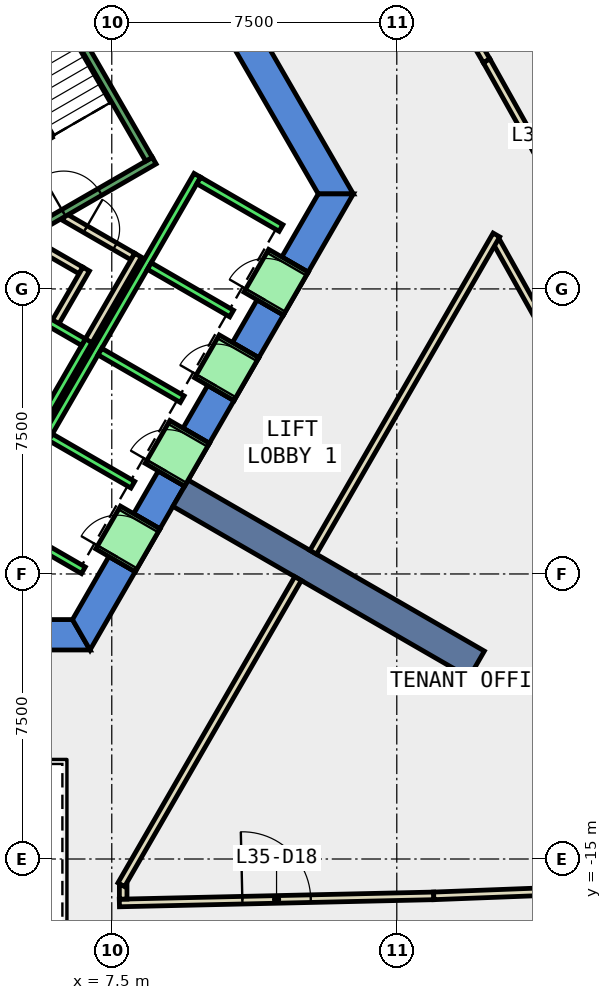
"""IFC4 building model, lengths in metres.
Left out: names, types, materials, properties, quantities, classifications, styles, units other than length and angle.
Written with IfcOpenShell. Run it as: python <this file> out.ifc"""

import sys

from ifc_helpers import new_model, si_unit, direction, frame, frame_2d, origin, place, context, subcontext, project, spatial, polyline, rectangle, outline, extrude, element, fill, save


model = new_model("IFC4")
c1 = context("Model", 3, precision=1e-05, world=origin(), true_north=direction((0.0, 1.0)))
c2 = subcontext(c1, "Body", "Model", "MODEL_VIEW")
j1 = project(units=[si_unit("LENGTHUNIT", "METRE"), si_unit("PLANEANGLEUNIT", "RADIAN")], contexts=[c1])
p1 = place(None, origin())
s1 = spatial("IfcSite", under=j1, at=p1, CompositionType="ELEMENT")
p2 = place(p1, origin())
s2 = spatial("IfcBuilding", under=s1, at=p2, CompositionType="ELEMENT")
p3 = place(p2, frame((0.0, 0.0, 159.2)))
s3 = spatial("IfcBuildingStorey", under=s2, at=p3, CompositionType="ELEMENT", Elevation=159.2)
p4 = place(p3, frame((0.0, 0.0, -0.4)))
e1 = element("IfcWall", 1, at=p4, inside=s3, PredefinedType="SHEAR", context=c2, shape_type="SweptSolid", body=[
    extrude(outline(polyline([(8.517, 11.748), (7.824, 11.348), (12.933, 2.5), (13.856, 2.5), (8.517, 11.748)])), origin(), (0.0, 0.0, 1.0), 4.2),
])
p5 = place(p3, frame((0.0, 0.0, -0.4)))
e2 = element("IfcWall", 2, at=p5, inside=s3, PredefinedType="SHEAR", context=c2, shape_type="SweptSolid", body=[
    extrude(outline(polyline([(5.75, -8.7), (5.75, -9.5), (6.928, -9.5), (6.466, -8.7), (5.75, -8.7)])), origin(), (0.0, 0.0, 1.0), 4.2),
])
p6 = place(p3, frame((0.0, 0.0, -0.4)))
e3 = element("IfcWall", 3, at=p6, inside=s3, PredefinedType="SHEAR", context=c2, shape_type="SweptSolid", body=[
    extrude(outline(polyline([(8.117, -7.44), (7.424, -7.04), (6.466, -8.7), (6.928, -9.5), (8.117, -7.44)])), origin(), (0.0, 0.0, 1.0), 4.2),
])
p7 = place(p3, frame((0.0, 0.0, -0.4)))
e4 = element("IfcWall", 4, at=p7, inside=s3, PredefinedType="SHEAR", context=c2, shape_type="SweptSolid", body=[
    extrude(outline(polyline([(9.417, -5.189), (8.724, -4.789), (8.075, -5.914), (8.767, -6.314), (9.417, -5.189)])), origin(), (0.0, 0.0, 1.0), 4.2),
])
p8 = place(p3, frame((0.0, 0.0, -0.4)))
e5 = element("IfcWall", 5, at=p8, inside=s3, PredefinedType="SHEAR", context=c2, shape_type="SweptSolid", body=[
    extrude(outline(polyline([(10.717, -2.937), (10.025, -2.537), (9.374, -3.663), (10.067, -4.063), (10.717, -2.937)])), origin(), (0.0, 0.0, 1.0), 4.2),
])
p9 = place(p3, frame((0.0, 0.0, -0.4)))
e6 = element("IfcWall", 6, at=p9, inside=s3, PredefinedType="SHEAR", context=c2, shape_type="SweptSolid", body=[
    extrude(outline(polyline([(12.017, -0.686), (11.324, -0.286), (10.675, -1.411), (11.367, -1.811), (12.017, -0.686)])), origin(), (0.0, 0.0, 1.0), 4.2),
])
p10 = place(p3, frame((0.0, 0.0, -0.4)))
e7 = element("IfcWall", 7, at=p10, inside=s3, PredefinedType="SHEAR", context=c2, shape_type="SweptSolid", body=[
    extrude(outline(polyline([(11.974, 0.84), (12.667, 0.44), (13.856, 2.5), (12.933, 2.5), (11.974, 0.84)])), origin(), (0.0, 0.0, 1.0), 4.2),
])
p11 = place(p3, frame((0.0, 0.0, 3.6)))
e8 = element("IfcWall", 8, at=p11, inside=s3, PredefinedType="SHEAR", context=c2, shape_type="SweptSolid", body=[
    extrude(outline(polyline([(8.767, -6.314), (8.075, -5.914), (7.424, -7.04), (8.117, -7.44), (8.767, -6.314)])), origin(), (0.0, 0.0, 1.0), 0.2),
])
p12 = place(p3, frame((0.0, 0.0, 3.6)))
e9 = element("IfcWall", 9, at=p12, inside=s3, PredefinedType="SHEAR", context=c2, shape_type="SweptSolid", body=[
    extrude(outline(polyline([(10.067, -4.063), (9.374, -3.663), (8.724, -4.789), (9.417, -5.189), (10.067, -4.063)])), origin(), (0.0, 0.0, 1.0), 0.2),
])
p13 = place(p3, frame((0.0, 0.0, 3.6)))
e10 = element("IfcWall", 10, at=p13, inside=s3, PredefinedType="SHEAR", context=c2, shape_type="SweptSolid", body=[
    extrude(outline(polyline([(11.367, -1.811), (10.675, -1.411), (10.025, -2.537), (10.717, -2.937), (11.367, -1.811)])), origin(), (0.0, 0.0, 1.0), 0.2),
])
p14 = place(p3, frame((0.0, 0.0, 3.6)))
e11 = element("IfcWall", 11, at=p14, inside=s3, PredefinedType="SHEAR", context=c2, shape_type="SweptSolid", body=[
    extrude(outline(polyline([(12.667, 0.44), (11.974, 0.84), (11.324, -0.286), (12.017, -0.686), (12.667, 0.44)])), origin(), (0.0, 0.0, 1.0), 0.2),
])
p15 = place(p3, frame((9.31, -5.375, -0.4), z_axis=(0.0, 0.0, 1.0), x_axis=(0.866017533419, -0.500013631625, 0.0)))
e12 = element("IfcWall", 12, at=p15, inside=s3, PredefinedType="SHEAR", context=c2, shape_type="SweptSolid", body=[
    extrude(rectangle(XDim=9.0, YDim=0.8, at=frame_2d((4.5, 0.0))), origin(), (0.0, 0.0, 1.0), 4.2),
])
p16 = place(p3, frame((7.7, -16.157, 0.0), z_axis=(0.0, 0.0, 1.0), x_axis=(0.999744539931, 0.022602098978, 0.0)))
e13 = element("IfcWall", 13, at=p16, inside=s3, PredefinedType="PARTITIONING", context=c2, shape_type="SweptSolid", body=[
    extrude(rectangle(XDim=8.274, YDim=0.2, at=frame_2d((4.137, 0.0))), origin(), (0.0, 0.0, 1.0), 3.8),
])
p17 = place(p16, frame((3.237, 0.0, 0.0)))
e14 = element("IfcOpeningElement", 14, at=p17, cuts=e13, PredefinedType="OPENING", context=c2, shape_type="SweptSolid", body=[
    extrude(rectangle(XDim=1.8, YDim=2.1, at=frame_2d((0.9, 1.05))), frame((0.0, 0.11, 0.0), z_axis=(0.0, -1.0, 0.0), x_axis=(1.0, 0.0, 0.0)), (0.0, 0.0, 1.0), 0.22),
])
p18 = place(p3, frame((15.972, -15.97, 0.0), z_axis=(0.0, 0.0, 1.0), x_axis=(0.999262695969, 0.038393546916, 0.0)))
e15 = element("IfcWall", 15, at=p18, inside=s3, PredefinedType="PARTITIONING", context=c2, shape_type="SweptSolid", body=[
    extrude(rectangle(XDim=7.344, YDim=0.2, at=frame_2d((3.672, 0.0))), origin(), (0.0, 0.0, 1.0), 3.8),
])
p19 = place(p3, frame((18.93, -1.095, 0.0), z_axis=(0.0, 0.0, 1.0), x_axis=(-0.488268004118, 0.872693735599, 0.0)))
e16 = element("IfcWall", 16, at=p19, inside=s3, PredefinedType="PARTITIONING", context=c2, shape_type="SweptSolid", body=[
    extrude(rectangle(XDim=2.683, YDim=0.2, at=frame_2d((1.341, 0.0))), origin(), (0.0, 0.0, 1.0), 3.8),
])
p20 = place(p3, frame((15.659, 8.954, 0.0), z_axis=(0.0, 0.0, 1.0), x_axis=(0.50001992892, -0.866013897511, 0.0)))
e17 = element("IfcWall", 17, at=p20, inside=s3, PredefinedType="PARTITIONING", context=c2, shape_type="SweptSolid", body=[
    extrude(rectangle(XDim=3.41, YDim=0.2, at=frame_2d((1.705, 0.0))), origin(), (0.0, 0.0, 1.0), 3.8),
])
p21 = place(p3, frame((17.364, 6.001, 0.0), z_axis=(0.0, 0.0, 1.0), x_axis=(0.488528981592, -0.872547668695, 0.0)))
e18 = element("IfcWall", 18, at=p21, inside=s3, PredefinedType="PARTITIONING", context=c2, shape_type="SweptSolid", body=[
    extrude(rectangle(XDim=6.896, YDim=0.2, at=frame_2d((3.448, 0.0))), origin(), (0.0, 0.0, 1.0), 3.8),
])
p22 = place(p21, frame((3.023, 0.0, 0.0)))
e19 = element("IfcOpeningElement", 19, at=p22, cuts=e18, PredefinedType="OPENING", context=c2, shape_type="SweptSolid", body=[
    extrude(rectangle(XDim=1.0, YDim=2.1, at=frame_2d((0.5, 1.05))), frame((0.0, 0.11, 0.0), z_axis=(0.0, -1.0, 0.0), x_axis=(1.0, 0.0, 0.0)), (0.0, 0.0, 1.0), 0.22),
])
p23 = place(p3, frame((5.499, 1.172, 0.0), z_axis=(0.0, 0.0, 1.0), x_axis=(0.866333505267, -0.499465972466, 0.0)))
e20 = element("IfcWall", 20, at=p23, inside=s3, PredefinedType="PARTITIONING", context=c2, shape_type="SweptSolid", body=[
    extrude(rectangle(XDim=1.374, YDim=0.2, at=frame_2d((0.687, 0.0))), origin(), (0.0, 0.0, 1.0), 3.8),
])
p24 = place(p3, frame((6.826, 0.522, 0.0), z_axis=(0.0, 0.0, 1.0), x_axis=(-0.500016722714, -0.866015748706, 0.0)))
e21 = element("IfcWall", 21, at=p24, inside=s3, PredefinedType="PARTITIONING", context=c2, shape_type="SweptSolid", body=[
    extrude(rectangle(XDim=1.7, YDim=0.2, at=frame_2d((0.85, 0.0))), origin(), (0.0, 0.0, 1.0), 3.8),
])
p25 = place(p3, frame((6.25, 1.894, 0.0), z_axis=(0.0, 0.0, 1.0), x_axis=(0.866043184279, -0.499969202016, 0.0)))
e22 = element("IfcWall", 22, at=p25, inside=s3, PredefinedType="PARTITIONING", context=c2, shape_type="SweptSolid", body=[
    extrude(rectangle(XDim=2.084, YDim=0.2, at=frame_2d((1.042, 0.0))), origin(), (0.0, 0.0, 1.0), 3.8),
])
p26 = place(p25, frame((0.642, 0.0, 0.0)))
e23 = element("IfcOpeningElement", 23, at=p26, cuts=e22, PredefinedType="OPENING", context=c2, shape_type="SweptSolid", body=[
    extrude(rectangle(XDim=0.9, YDim=2.1, at=frame_2d((0.45, 1.05))), frame((0.0, 0.11, 0.0), z_axis=(0.0, -1.0, 0.0), x_axis=(1.0, 0.0, 0.0)), (0.0, 0.0, 1.0), 0.22),
])
p27 = place(p3, frame((8.192, 0.888, 0.0), z_axis=(0.0, 0.0, 1.0), x_axis=(-0.499940625693, -0.866059680843, 0.0)))
e24 = element("IfcWall", 24, at=p27, inside=s3, PredefinedType="PARTITIONING", context=c2, shape_type="SweptSolid", body=[
    extrude(rectangle(XDim=2.68, YDim=0.2, at=frame_2d((1.34, 0.0))), origin(), (0.0, 0.0, 1.0), 3.8),
])
p28 = place(p3, frame((7.8, -15.69, 0.0), z_axis=(0.0, 0.0, 1.0), x_axis=(0.0, -1.0, 0.0)))
e25 = element("IfcWall", 25, at=p28, inside=s3, PredefinedType="PARTITIONING", context=c2, shape_type="SweptSolid", body=[
    extrude(rectangle(XDim=0.365, YDim=0.2, at=frame_2d((0.183, 0.0))), origin(), (0.0, 0.0, 1.0), 3.8),
])
p29 = place(p3, frame((17.621, 1.42, 0.0), z_axis=(0.0, 0.0, 1.0), x_axis=(-0.499987708133, -0.866032500381, 0.0)))
e26 = element("IfcWall", 26, at=p29, inside=s3, PredefinedType="PARTITIONING", context=c2, shape_type="SweptSolid", body=[
    extrude(rectangle(XDim=9.64, YDim=0.2, at=frame_2d((4.82, 0.0))), origin(), (0.0, 0.0, 1.0), 3.8),
])
p30 = place(p3, frame((12.401, -7.621, 0.0), z_axis=(0.0, 0.0, 1.0), x_axis=(-0.499983724212, -0.866034800411, 0.0)))
e27 = element("IfcWall", 27, at=p30, inside=s3, PredefinedType="PARTITIONING", context=c2, shape_type="SweptSolid", body=[
    extrude(rectangle(XDim=9.302, YDim=0.2, at=frame_2d((4.651, 0.0))), origin(), (0.0, 0.0, 1.0), 3.8),
])
p31 = place(p3, frame((5.492, -3.788, 0.0), z_axis=(0.0, 0.0, 1.0), x_axis=(0.500011755427, 0.866018616679, 0.0)))
e28 = element("IfcWall", 28, at=p31, inside=s3, PredefinedType="STANDARD", context=c2, shape_type="SweptSolid", body=[
    extrude(rectangle(XDim=2.8, YDim=0.2, at=frame_2d((1.4, 0.0))), origin(), (0.0, 0.0, 1.0), 3.8),
])
p32 = place(p3, frame((4.677, -0.2, 0.0), z_axis=(0.0, 0.0, 1.0), x_axis=(0.865973769406, -0.500089422704, 0.0)))
e29 = element("IfcWall", 29, at=p32, inside=s3, PredefinedType="STANDARD", context=c2, shape_type="SweptSolid", body=[
    extrude(rectangle(XDim=2.399, YDim=0.2, at=frame_2d((1.2, 0.0))), origin(), (0.0, 0.0, 1.0), 3.8),
])
p33 = place(p3, frame((4.451, -6.19, 0.0), z_axis=(0.0, 0.0, 1.0), x_axis=(0.50000090737, 0.866024879913, 0.0)))
e30 = element("IfcWall", 30, at=p33, inside=s3, PredefinedType="STANDARD", context=c2, shape_type="SweptSolid", body=[
    extrude(rectangle(XDim=10.6, YDim=0.2, at=frame_2d((5.3, 0.0))), origin(), (0.0, 0.0, 1.0), 3.8),
])
for number, where, z_axis, x_axis in (
    (31, (4.588, -6.153, 0.0), (0.0, 0.0, 1.0), (0.866, -0.5, 0.0)),
    (32, (5.888, -3.902, 0.0), (0.0, 0.0, 1.0), (0.866, -0.5, 0.0)),
    (33, (7.188, -1.65, 0.0), (0.0, 0.0, 1.0), (0.866, -0.5, 0.0)),
    (34, (8.488, 0.602, 0.0), (0.0, 0.0, 1.0), (0.866, -0.5, 0.0)),
):
    element("IfcWall", number, at=place(p3, frame(where, z_axis=z_axis, x_axis=x_axis)), inside=s3, PredefinedType="STANDARD", context=c2, shape_type="SweptSolid", body=[
        extrude(rectangle(XDim=2.5, YDim=0.2, at=frame_2d((1.25, 0.0))), origin(), (0.0, 0.0, 1.0), 3.8),
    ])
p34 = place(p3, frame((9.788, 2.853, 0.0), z_axis=(0.0, 0.0, 1.0), x_axis=(0.865998541277, -0.500046524342, 0.0)))
e35 = element("IfcWall", 35, at=p34, inside=s3, PredefinedType="STANDARD", context=c2, shape_type="SweptSolid", body=[
    extrude(rectangle(XDim=2.5, YDim=0.2, at=frame_2d((1.25, 0.0))), origin(), (0.0, 0.0, 1.0), 3.8),
])
p35 = place(p3, frame((7.598, -7.14, 0.0), z_axis=(0.0, 0.0, 1.0), x_axis=(0.500362116554, 0.865816234728, 0.0)))
e36 = element("IfcWall", 36, at=p35, inside=s3, PredefinedType="STANDARD", context=c2, shape_type="SweptSolid", body=[
    extrude(rectangle(XDim=1.299, YDim=1.2, at=frame_2d((0.65, 0.0))), origin(), (0.0, 0.0, 1.0), 2.4),
])
p36 = place(p35, frame((0.1, 0.0, 0.0)))
e37 = element("IfcOpeningElement", 37, at=p36, cuts=e36, PredefinedType="OPENING", context=c2, shape_type="SweptSolid", body=[
    extrude(rectangle(XDim=1.1, YDim=2.3, at=frame_2d((0.55, 1.15))), frame((0.0, 0.61, 0.0), z_axis=(0.0, -1.0, 0.0), x_axis=(1.0, 0.0, 0.0)), (0.0, 0.0, 1.0), 1.22),
])
p37 = place(p3, frame((8.898, -4.889, 0.0), z_axis=(0.0, 0.0, 1.0), x_axis=(0.500036693733, 0.866004217611, 0.0)))
e38 = element("IfcWall", 38, at=p37, inside=s3, PredefinedType="STANDARD", context=c2, shape_type="SweptSolid", body=[
    extrude(rectangle(XDim=1.3, YDim=1.2, at=frame_2d((0.65, 0.0))), origin(), (0.0, 0.0, 1.0), 2.4),
])
p38 = place(p37, frame((0.1, 0.0, 0.0)))
e39 = element("IfcOpeningElement", 39, at=p38, cuts=e38, PredefinedType="OPENING", context=c2, shape_type="SweptSolid", body=[
    extrude(rectangle(XDim=1.1, YDim=2.3, at=frame_2d((0.55, 1.15))), frame((0.0, 0.61, 0.0), z_axis=(0.0, -1.0, 0.0), x_axis=(1.0, 0.0, 0.0)), (0.0, 0.0, 1.0), 1.22),
])
p39 = place(p3, frame((10.198, -2.637, 0.0), z_axis=(0.0, 0.0, 1.0), x_axis=(0.49989585183, 0.866085525409, 0.0)))
e40 = element("IfcWall", 40, at=p39, inside=s3, PredefinedType="STANDARD", context=c2, shape_type="SweptSolid", body=[
    extrude(rectangle(XDim=1.3, YDim=1.2, at=frame_2d((0.65, 0.0))), origin(), (0.0, 0.0, 1.0), 2.4),
])
p40 = place(p39, frame((0.1, 0.0, 0.0)))
e41 = element("IfcOpeningElement", 41, at=p40, cuts=e40, PredefinedType="OPENING", context=c2, shape_type="SweptSolid", body=[
    extrude(rectangle(XDim=1.1, YDim=2.3, at=frame_2d((0.55, 1.15))), frame((0.0, 0.61, 0.0), z_axis=(0.0, -1.0, 0.0), x_axis=(1.0, 0.0, 0.0)), (0.0, 0.0, 1.0), 1.22),
])
p41 = place(p3, frame((11.498, -0.385, 0.0), z_axis=(0.0, 0.0, 1.0), x_axis=(0.500221244143, 0.865897630733, 0.0)))
e42 = element("IfcWall", 42, at=p41, inside=s3, PredefinedType="STANDARD", context=c2, shape_type="SweptSolid", body=[
    extrude(rectangle(XDim=1.299, YDim=1.2, at=frame_2d((0.65, 0.0))), origin(), (0.0, 0.0, 1.0), 2.4),
])
p42 = place(p41, frame((0.1, 0.0, 0.0)))
e43 = element("IfcOpeningElement", 43, at=p42, cuts=e42, PredefinedType="OPENING", context=c2, shape_type="SweptSolid", body=[
    extrude(rectangle(XDim=1.1, YDim=2.3, at=frame_2d((0.55, 1.15))), frame((0.0, 0.61, 0.0), z_axis=(0.0, -1.0, 0.0), x_axis=(1.0, 0.0, 0.0)), (0.0, 0.0, 1.0), 1.22),
])
p43 = place(p3, frame((4.806, 1.176, 0.0), z_axis=(0.0, 0.0, 1.0), x_axis=(0.866059941101, 0.499940174841, 0.0)))
e44 = element("IfcWall", 44, at=p43, inside=s3, PredefinedType="STANDARD", context=c2, shape_type="SweptSolid", body=[
    extrude(rectangle(XDim=4.4, YDim=0.2, at=frame_2d((2.2, 0.0))), origin(), (0.0, 0.0, 1.0), 3.8),
])
p44 = place(p43, frame((1.65, 0.0, 0.0)))
e45 = element("IfcOpeningElement", 45, at=p44, cuts=e44, PredefinedType="OPENING", context=c2, shape_type="SweptSolid", body=[
    extrude(rectangle(XDim=1.1, YDim=2.2, at=frame_2d((0.55, 1.1))), frame((0.0, 0.11, 0.0), z_axis=(0.0, -1.0, 0.0), x_axis=(1.0, 0.0, 0.0)), (0.0, 0.0, 1.0), 0.22),
])
p45 = place(p3, frame((8.48, 3.412, 0.0), z_axis=(0.0, 0.0, 1.0), x_axis=(-0.499978703459, 0.866037698999, 0.0)))
e46 = element("IfcWall", 46, at=p45, inside=s3, PredefinedType="STANDARD", context=c2, shape_type="SweptSolid", body=[
    extrude(rectangle(XDim=6.9, YDim=0.2, at=frame_2d((3.45, 0.0))), origin(), (0.0, 0.0, 1.0), 3.8),
])
p46 = place(p17, origin())
e47 = element("IfcDoor", 47, at=p46, inside=s3, OperationType="DOUBLE_DOOR_SINGLE_SWING", PredefinedType="DOOR", context=c2, shape_type="SweptSolid", body=[
    extrude(rectangle(XDim=1.8, YDim=2.1, at=frame_2d((0.9, 1.05))), frame((0.0, 0.025, 0.0), z_axis=(0.0, -1.0, 0.0), x_axis=(1.0, 0.0, 0.0)), (0.0, 0.0, 1.0), 0.05),
])
fill(e14, e47)
p47 = place(p26, origin())
e48 = element("IfcDoor", 48, at=p47, inside=s3, OperationType="SINGLE_SWING_LEFT", PredefinedType="DOOR", context=c2, shape_type="SweptSolid", body=[
    extrude(rectangle(XDim=0.9, YDim=2.1, at=frame_2d((0.45, 1.05))), frame((0.0, 0.025, 0.0), z_axis=(0.0, -1.0, 0.0), x_axis=(1.0, 0.0, 0.0)), (0.0, 0.0, 1.0), 0.05),
])
fill(e23, e48)
p48 = place(p36, origin())
e49 = element("IfcDoor", 49, at=p48, inside=s3, OperationType="SLIDING_TO_LEFT", PredefinedType="DOOR", context=c2, shape_type="SweptSolid", body=[
    extrude(rectangle(XDim=1.1, YDim=2.3, at=frame_2d((0.55, 1.15))), frame((0.0, 0.025, 0.0), z_axis=(0.0, -1.0, 0.0), x_axis=(1.0, 0.0, 0.0)), (0.0, 0.0, 1.0), 0.05),
])
fill(e37, e49)
p49 = place(p38, origin())
e50 = element("IfcDoor", 50, at=p49, inside=s3, OperationType="SLIDING_TO_LEFT", PredefinedType="DOOR", context=c2, shape_type="SweptSolid", body=[
    extrude(rectangle(XDim=1.1, YDim=2.3, at=frame_2d((0.55, 1.15))), frame((0.0, 0.025, 0.0), z_axis=(0.0, -1.0, 0.0), x_axis=(1.0, 0.0, 0.0)), (0.0, 0.0, 1.0), 0.05),
])
fill(e39, e50)
p50 = place(p40, origin())
e51 = element("IfcDoor", 51, at=p50, inside=s3, OperationType="SLIDING_TO_LEFT", PredefinedType="DOOR", context=c2, shape_type="SweptSolid", body=[
    extrude(rectangle(XDim=1.1, YDim=2.3, at=frame_2d((0.55, 1.15))), frame((0.0, 0.025, 0.0), z_axis=(0.0, -1.0, 0.0), x_axis=(1.0, 0.0, 0.0)), (0.0, 0.0, 1.0), 0.05),
])
fill(e41, e51)
p51 = place(p42, origin())
e52 = element("IfcDoor", 52, at=p51, inside=s3, OperationType="SLIDING_TO_LEFT", PredefinedType="DOOR", context=c2, shape_type="SweptSolid", body=[
    extrude(rectangle(XDim=1.1, YDim=2.3, at=frame_2d((0.55, 1.15))), frame((0.0, 0.025, 0.0), z_axis=(0.0, -1.0, 0.0), x_axis=(1.0, 0.0, 0.0)), (0.0, 0.0, 1.0), 0.05),
])
fill(e43, e52)
p52 = place(p44, origin())
e53 = element("IfcDoor", 53, at=p52, inside=s3, OperationType="SINGLE_SWING_LEFT", PredefinedType="DOOR", context=c2, shape_type="SweptSolid", body=[
    extrude(rectangle(XDim=1.1, YDim=2.2, at=frame_2d((0.55, 1.1))), frame((0.0, 0.025, 0.0), z_axis=(0.0, -1.0, 0.0), x_axis=(1.0, 0.0, 0.0)), (0.0, 0.0, 1.0), 0.05),
])
fill(e45, e53)
save(model, sys.argv[1])
